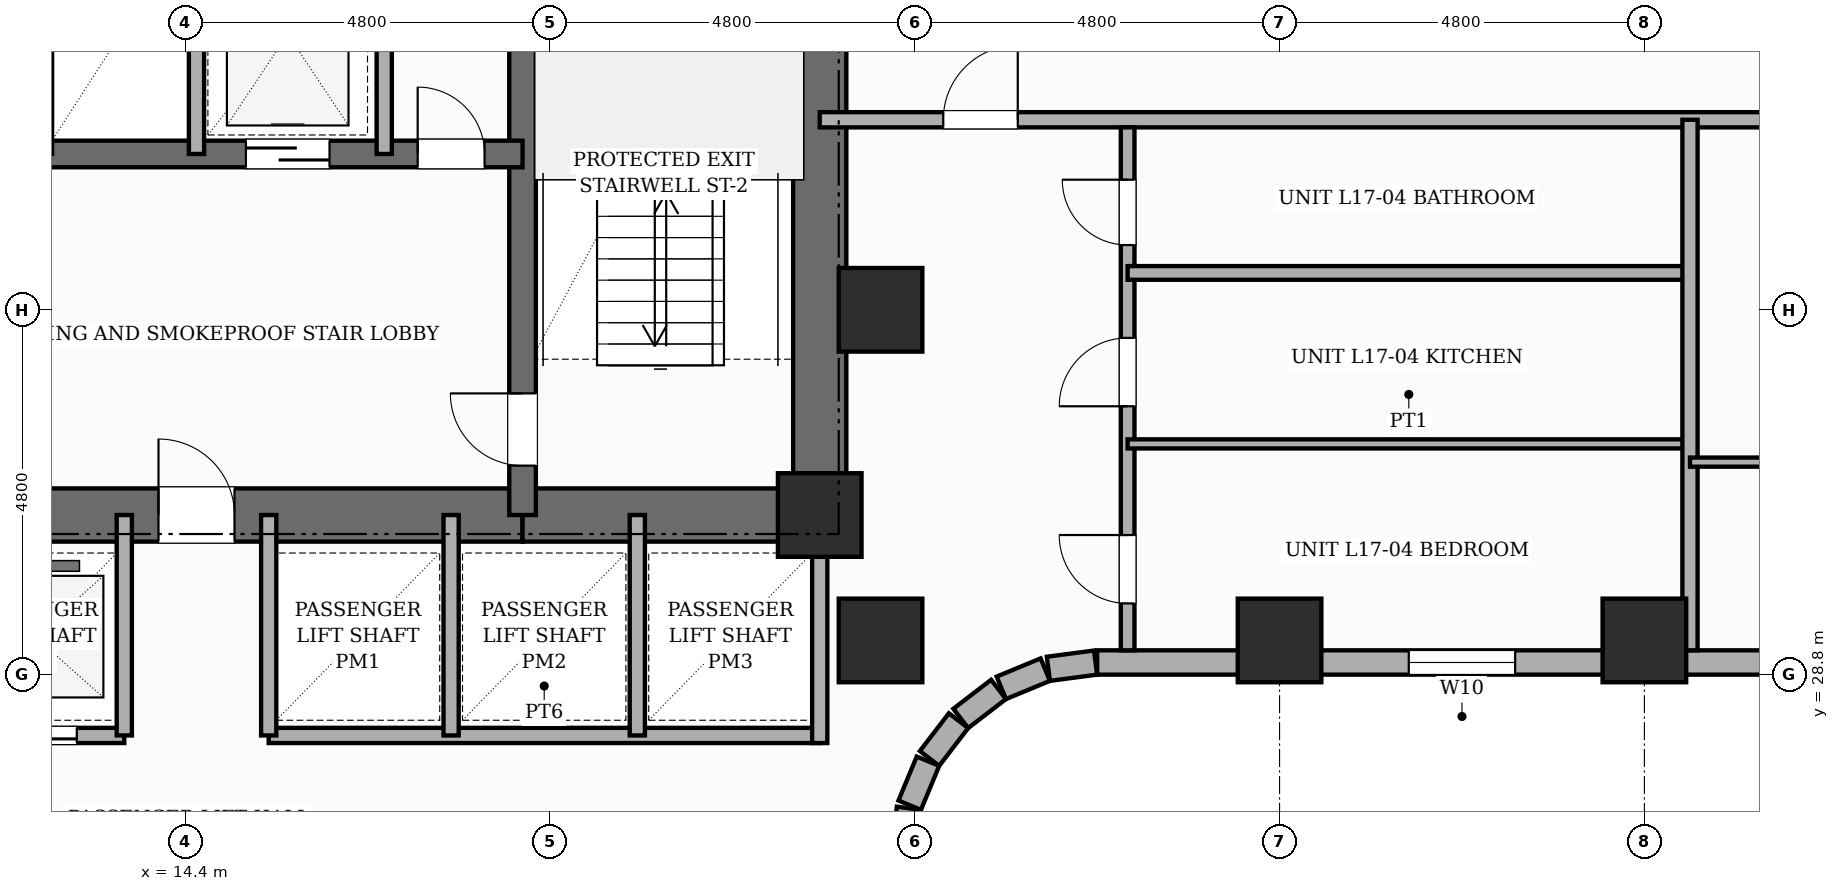
"""IFC4 building model, lengths in metres.
Left out: names, types, materials, properties, quantities, classifications, styles, units other than length and angle.
Written with IfcOpenShell. Run it as: python <this file> out.ifc"""

import sys

from ifc_helpers import new_model, si_unit, direction, frame, frame_2d, origin, origin_2d, place, context, subcontext, project, spatial, rectangle, extrude, element, fill, save


model = new_model("IFC4")
c1 = context("Model", 3, precision=1e-05, world=origin(), true_north=direction((0.0, 1.0)))
c2 = subcontext(c1, "Body", "Model", "MODEL_VIEW")
j1 = project(units=[si_unit("LENGTHUNIT", "METRE"), si_unit("PLANEANGLEUNIT", "RADIAN")], contexts=[c1])
p1 = place(None, origin())
s1 = spatial("IfcSite", under=j1, at=p1, CompositionType="ELEMENT")
p2 = place(p1, origin())
s2 = spatial("IfcBuilding", under=s1, at=p2, CompositionType="ELEMENT")
p3 = place(p2, frame((0.0, 0.0, 68.2)))
s3 = spatial("IfcBuildingStorey", under=s2, at=p3, CompositionType="ELEMENT", Elevation=68.2)
p4 = place(p3, frame((22.75, 30.55, 0.0), z_axis=(0.0, 0.0, 1.0), x_axis=(0.0, 1.0, 0.0)))
e1 = element("IfcWall", 1, at=p4, inside=s3, PredefinedType="SHEAR", context=c2, shape_type="SweptSolid", body=[
    extrude(rectangle(XDim=15.6, YDim=0.7, at=frame_2d((7.8, 0.0))), origin(), (0.0, 0.0, 1.0), 3.6),
])
p5 = place(p4, frame((10.8, 0.0, 0.0)))
e2 = element("IfcOpeningElement", 2, at=p5, cuts=e1, PredefinedType="OPENING", context=c2, shape_type="SweptSolid", body=[
    extrude(rectangle(XDim=1.0, YDim=2.15, at=frame_2d((0.5, 1.075))), frame((0.0, 0.36, 0.0), z_axis=(0.0, -1.0, 0.0), x_axis=(1.0, 0.0, 0.0)), (0.0, 0.0, 1.0), 0.72),
])
p6 = place(p3, frame((9.96, 30.9, 0.0), z_axis=(0.0, 0.0, 1.0), x_axis=(1.0, 0.0, 0.0)))
e3 = element("IfcWall", 3, at=p6, inside=s3, PredefinedType="SHEAR", context=c2, shape_type="SweptSolid", body=[
    extrude(rectangle(XDim=8.88, YDim=0.7, at=frame_2d((4.44, 0.0))), origin(), (0.0, 0.0, 1.0), 3.6),
])
p7 = place(p6, frame((4.09, 0.0, 0.0)))
e4 = element("IfcOpeningElement", 4, at=p7, cuts=e3, PredefinedType="OPENING", context=c2, shape_type="SweptSolid", body=[
    extrude(rectangle(XDim=1.0, YDim=2.15, at=frame_2d((0.5, 1.075))), frame((0.0, 0.36, 0.0), z_axis=(0.0, -1.0, 0.0), x_axis=(1.0, 0.0, 0.0)), (0.0, 0.0, 1.0), 0.72),
])
p8 = place(p3, frame((18.84, 30.9, 0.0), z_axis=(0.0, 0.0, 1.0), x_axis=(1.0, 0.0, 0.0)))
e5 = element("IfcWall", 5, at=p8, inside=s3, PredefinedType="SHEAR", context=c2, shape_type="SweptSolid", body=[
    extrude(rectangle(XDim=3.91, YDim=0.7, at=frame_2d((1.955, 0.0))), origin(), (0.0, 0.0, 1.0), 3.6),
])
p9 = place(p3, frame((18.84, 30.9, 0.0), z_axis=(0.0, 0.0, 1.0), x_axis=(0.0, 1.0, 0.0)))
e6 = element("IfcWall", 6, at=p9, inside=s3, PredefinedType="SHEAR", context=c2, shape_type="SweptSolid", body=[
    extrude(rectangle(XDim=14.9, YDim=0.35, at=frame_2d((7.45, 0.0))), origin(), (0.0, 0.0, 1.0), 3.6),
])
p10 = place(p9, frame((0.65, 0.0, 0.0)))
e7 = element("IfcOpeningElement", 7, at=p10, cuts=e6, PredefinedType="OPENING", context=c2, shape_type="SweptSolid", body=[
    extrude(rectangle(XDim=0.95, YDim=2.1, at=frame_2d((0.475, 1.05))), frame((0.0, 0.185, 0.0), z_axis=(0.0, -1.0, 0.0), x_axis=(1.0, 0.0, 0.0)), (0.0, 0.0, 1.0), 0.37),
])
p11 = place(p9, frame((10.45, 0.0, 0.0)))
e8 = element("IfcOpeningElement", 8, at=p11, cuts=e6, PredefinedType="OPENING", context=c2, shape_type="SweptSolid", body=[
    extrude(rectangle(XDim=1.0, YDim=2.15, at=frame_2d((0.5, 1.075))), frame((0.0, 0.185, 0.0), z_axis=(0.0, -1.0, 0.0), x_axis=(1.0, 0.0, 0.0)), (0.0, 0.0, 1.0), 0.37),
])
p12 = place(p3, frame((9.96, 35.65, 0.0), z_axis=(0.0, 0.0, 1.0), x_axis=(1.0, 0.0, 0.0)))
e9 = element("IfcWall", 9, at=p12, inside=s3, PredefinedType="SHEAR", context=c2, shape_type="SweptSolid", body=[
    extrude(rectangle(XDim=8.88, YDim=0.35, at=frame_2d((4.44, 0.0))), origin(), (0.0, 0.0, 1.0), 3.6),
])
p13 = place(p12, frame((0.84, 0.0, 0.0)))
e10 = element("IfcOpeningElement", 10, at=p13, cuts=e9, PredefinedType="OPENING", context=c2, shape_type="SweptSolid", body=[
    extrude(rectangle(XDim=1.1, YDim=2.15, at=frame_2d((0.55, 1.075))), frame((0.0, 0.185, 0.0), z_axis=(0.0, -1.0, 0.0), x_axis=(1.0, 0.0, 0.0)), (0.0, 0.0, 1.0), 0.37),
])
p14 = place(p12, frame((5.24, 0.0, 0.0)))
e11 = element("IfcOpeningElement", 11, at=p14, cuts=e9, PredefinedType="OPENING", context=c2, shape_type="SweptSolid", body=[
    extrude(rectangle(XDim=1.1, YDim=2.15, at=frame_2d((0.55, 1.075))), frame((0.0, 0.185, 0.0), z_axis=(0.0, -1.0, 0.0), x_axis=(1.0, 0.0, 0.0)), (0.0, 0.0, 1.0), 0.37),
])
p15 = place(p12, frame((7.5, 0.0, 0.0)))
e12 = element("IfcOpeningElement", 12, at=p15, cuts=e9, PredefinedType="OPENING", context=c2, shape_type="SweptSolid", body=[
    extrude(rectangle(XDim=0.88, YDim=2.1, at=frame_2d((0.44, 1.05))), frame((0.0, 0.185, 0.0), z_axis=(0.0, -1.0, 0.0), x_axis=(1.0, 0.0, 0.0)), (0.0, 0.0, 1.0), 0.37),
])
for number, where, z_axis, x_axis in (
    (13, (22.75, 30.9, 0.0), (0.0, 0.0, 1.0), (1.0, 0.0, 0.0)),
    (14, (23.55, 29.25, 0.0), (0.0, 0.0, 1.0), (1.0, 0.0, 0.0)),
    (15, (23.55, 33.6, 0.0), (0.0, 0.0, 1.0), (1.0, 0.0, 0.0)),
    (16, (28.8, 29.25, 0.0), (0.0, 0.0, 1.0), (1.0, 0.0, 0.0)),
    (17, (33.6, 29.25, 0.0), (0.0, 0.0, 1.0), (1.0, 0.0, 0.0)),
):
    element("IfcColumn", number, at=place(p3, frame(where, z_axis=z_axis, x_axis=x_axis)), inside=s3, PredefinedType="COLUMN", context=c2, shape_type="SweptSolid", body=[
        extrude(rectangle(XDim=1.1, YDim=1.1, at=origin_2d()), origin(), (0.0, 0.0, 1.0), 3.6),
    ])
p16 = place(p3, frame((55.2, 28.96, 0.0), z_axis=(0.0, 0.0, 1.0), x_axis=(-1.0, 0.0, 0.0)))
e18 = element("IfcWall", 18, at=p16, inside=s3, PredefinedType="STANDARD", context=c2, shape_type="SweptSolid", body=[
    extrude(rectangle(XDim=28.8, YDim=0.32, at=frame_2d((14.4, 0.0))), origin(), (0.0, 0.0, 1.0), 2.53),
])
p17 = place(p16, frame((23.3, 0.0, 0.65)))
e19 = element("IfcOpeningElement", 19, at=p17, cuts=e18, PredefinedType="OPENING", context=c2, shape_type="SweptSolid", body=[
    extrude(rectangle(XDim=1.4, YDim=1.1, at=frame_2d((0.7, 0.55))), frame((0.0, 0.17, 0.0), z_axis=(0.0, -1.0, 0.0), x_axis=(1.0, 0.0, 0.0)), (0.0, 0.0, 1.0), 0.34),
])
p18 = place(p16, frame((13.0, 0.0, 0.65)))
e20 = element("IfcOpeningElement", 20, at=p18, cuts=e18, PredefinedType="OPENING", context=c2, shape_type="SweptSolid", body=[
    extrude(rectangle(XDim=1.4, YDim=1.1, at=frame_2d((0.7, 0.55))), frame((0.0, 0.17, 0.0), z_axis=(0.0, -1.0, 0.0), x_axis=(1.0, 0.0, 0.0)), (0.0, 0.0, 1.0), 0.34),
])
p19 = place(p16, frame((4.79, 0.0, 0.65)))
e21 = element("IfcOpeningElement", 21, at=p19, cuts=e18, PredefinedType="OPENING", context=c2, shape_type="SweptSolid", body=[
    extrude(rectangle(XDim=1.4, YDim=1.1, at=frame_2d((0.7, 0.55))), frame((0.0, 0.17, 0.0), z_axis=(0.0, -1.0, 0.0), x_axis=(1.0, 0.0, 0.0)), (0.0, 0.0, 1.0), 0.34),
])
p20 = place(p16, frame((0.47, 0.0, 0.65)))
e22 = element("IfcOpeningElement", 22, at=p20, cuts=e18, PredefinedType="OPENING", context=c2, shape_type="SweptSolid", body=[
    extrude(rectangle(XDim=1.4, YDim=1.1, at=frame_2d((0.7, 0.55))), frame((0.0, 0.17, 0.0), z_axis=(0.0, -1.0, 0.0), x_axis=(1.0, 0.0, 0.0)), (0.0, 0.0, 1.0), 0.34),
])
p21 = place(p16, frame((15.055, 0.0, 0.45)))
e23 = element("IfcOpeningElement", 23, at=p21, cuts=e18, PredefinedType="OPENING", context=c2, shape_type="SweptSolid", body=[
    extrude(rectangle(XDim=0.95, YDim=1.8, at=frame_2d((0.475, 0.9))), frame((0.0, 0.17, 0.0), z_axis=(0.0, -1.0, 0.0), x_axis=(1.0, 0.0, 0.0)), (0.0, 0.0, 1.0), 0.34),
])
p22 = place(p3, frame((26.379, 28.958, 0.0), z_axis=(0.0, 0.0, 1.0), x_axis=(-0.991447664465, -0.130504898859, 0.0)))
e24 = element("IfcWall", 24, at=p22, inside=s3, PredefinedType="STANDARD", context=c2, shape_type="SweptSolid", body=[
    extrude(rectangle(XDim=0.627, YDim=0.32, at=frame_2d((0.313, 0.0))), origin(), (0.0, 0.0, 1.0), 2.53),
])
p23 = place(p3, frame((25.718, 28.866, 0.0), z_axis=(0.0, 0.0, 1.0), x_axis=(-0.923836271867, -0.382787856107, 0.0)))
e25 = element("IfcWall", 25, at=p23, inside=s3, PredefinedType="STANDARD", context=c2, shape_type="SweptSolid", body=[
    extrude(rectangle(XDim=0.626, YDim=0.32, at=frame_2d((0.313, 0.0))), origin(), (0.0, 0.0, 1.0), 3.35),
])
for number, where, z_axis, x_axis in (
    (26, (25.103, 28.605, 0.0), (0.0, 0.0, 1.0), (-0.793, -0.609, 0.0)),
    (27, (24.576, 28.195, 0.0), (0.0, 0.0, 1.0), (-0.609, -0.793, 0.0)),
):
    element("IfcWall", number, at=place(p3, frame(where, z_axis=z_axis, x_axis=x_axis)), inside=s3, PredefinedType="STANDARD", context=c2, shape_type="SweptSolid", body=[
        extrude(rectangle(XDim=0.626, YDim=0.32, at=frame_2d((0.313, 0.0))), origin(), (0.0, 0.0, 1.0), 3.35),
    ])
p24 = place(p3, frame((24.174, 27.661, 0.0), z_axis=(0.0, 0.0, 1.0), x_axis=(-0.382455093999, -0.923974080304, 0.0)))
e28 = element("IfcWall", 28, at=p24, inside=s3, PredefinedType="STANDARD", context=c2, shape_type="SweptSolid", body=[
    extrude(rectangle(XDim=0.626, YDim=0.32, at=frame_2d((0.313, 0.0))), origin(), (0.0, 0.0, 1.0), 3.35),
])
p25 = place(p3, frame((23.923, 27.042, 0.0), z_axis=(0.0, 0.0, 1.0), x_axis=(-0.130555323746, -0.9914410257, 0.0)))
e29 = element("IfcWall", 29, at=p25, inside=s3, PredefinedType="STANDARD", context=c2, shape_type="SweptSolid", body=[
    extrude(rectangle(XDim=0.626, YDim=0.32, at=frame_2d((0.313, 0.0))), origin(), (0.0, 0.0, 1.0), 2.53),
])
p26 = place(p3, frame((14.55, 35.65, 0.0), z_axis=(0.0, 0.0, 1.0), x_axis=(0.0, 1.0, 0.0)))
e30 = element("IfcWall", 30, at=p26, inside=s3, PredefinedType="POLYGONAL", context=c2, shape_type="SweptSolid", body=[
    extrude(rectangle(XDim=3.07, YDim=0.2, at=frame_2d((1.535, 0.0))), origin(), (0.0, 0.0, 1.0), 3.35),
])
p27 = place(p3, frame((17.02, 35.65, 0.0), z_axis=(0.0, 0.0, 1.0), x_axis=(0.0, 1.0, 0.0)))
e31 = element("IfcWall", 31, at=p27, inside=s3, PredefinedType="POLYGONAL", context=c2, shape_type="SweptSolid", body=[
    extrude(rectangle(XDim=5.15, YDim=0.2, at=frame_2d((2.575, 0.0))), origin(), (0.0, 0.0, 1.0), 3.35),
])
p28 = place(p3, frame((6.05, 28.0, 0.0), z_axis=(0.0, 0.0, 1.0), x_axis=(1.0, 0.0, 0.0)))
e32 = element("IfcWall", 32, at=p28, inside=s3, PredefinedType="POLYGONAL", context=c2, shape_type="SweptSolid", body=[
    extrude(rectangle(XDim=7.55, YDim=0.2, at=frame_2d((3.775, 0.0))), origin(), (0.0, 0.0, 1.0), 3.35),
])
p29 = place(p28, frame((0.925, 0.0, 0.0)))
e33 = element("IfcOpeningElement", 33, at=p29, cuts=e32, PredefinedType="OPENING", context=c2, shape_type="SweptSolid", body=[
    extrude(rectangle(XDim=1.1, YDim=2.15, at=frame_2d((0.55, 1.075))), frame((0.0, 0.11, 0.0), z_axis=(0.0, -1.0, 0.0), x_axis=(1.0, 0.0, 0.0)), (0.0, 0.0, 1.0), 0.22),
])
p30 = place(p28, frame((3.375, 0.0, 0.0)))
e34 = element("IfcOpeningElement", 34, at=p30, cuts=e32, PredefinedType="OPENING", context=c2, shape_type="SweptSolid", body=[
    extrude(rectangle(XDim=1.1, YDim=2.15, at=frame_2d((0.55, 1.075))), frame((0.0, 0.11, 0.0), z_axis=(0.0, -1.0, 0.0), x_axis=(1.0, 0.0, 0.0)), (0.0, 0.0, 1.0), 0.22),
])
p31 = place(p28, frame((5.825, 0.0, 0.0)))
e35 = element("IfcOpeningElement", 35, at=p31, cuts=e32, PredefinedType="OPENING", context=c2, shape_type="SweptSolid", body=[
    extrude(rectangle(XDim=1.1, YDim=2.15, at=frame_2d((0.55, 1.075))), frame((0.0, 0.11, 0.0), z_axis=(0.0, -1.0, 0.0), x_axis=(1.0, 0.0, 0.0)), (0.0, 0.0, 1.0), 0.22),
])
p32 = place(p3, frame((15.5, 28.0, 0.0), z_axis=(0.0, 0.0, 1.0), x_axis=(1.0, 0.0, 0.0)))
e36 = element("IfcWall", 36, at=p32, inside=s3, PredefinedType="POLYGONAL", context=c2, shape_type="SweptSolid", body=[
    extrude(rectangle(XDim=7.25, YDim=0.2, at=frame_2d((3.625, 0.0))), origin(), (0.0, 0.0, 1.0), 3.35),
])
p33 = place(p3, frame((22.75, 27.9, 0.0), z_axis=(0.0, 0.0, 1.0), x_axis=(0.0, 1.0, 0.0)))
e37 = element("IfcWall", 37, at=p33, inside=s3, PredefinedType="POLYGONAL", context=c2, shape_type="SweptSolid", body=[
    extrude(rectangle(XDim=3.0, YDim=0.2, at=frame_2d((1.5, 0.0))), origin(), (0.0, 0.0, 1.0), 3.35),
])
for number, where, z_axis, x_axis in (
    (38, (13.6, 28.0, 0.0), (0.0, 0.0, 1.0), (0.0, 1.0, 0.0)),
    (39, (15.5, 28.0, 0.0), (0.0, 0.0, 1.0), (0.0, 1.0, 0.0)),
    (40, (17.9, 28.0, 0.0), (0.0, 0.0, 1.0), (0.0, 1.0, 0.0)),
    (41, (20.35, 28.0, 0.0), (0.0, 0.0, 1.0), (0.0, 1.0, 0.0)),
):
    element("IfcWall", number, at=place(p3, frame(where, z_axis=z_axis, x_axis=x_axis)), inside=s3, PredefinedType="POLYGONAL", context=c2, shape_type="SweptSolid", body=[
        extrude(rectangle(XDim=2.9, YDim=0.2, at=frame_2d((1.45, 0.0))), origin(), (0.0, 0.0, 1.0), 3.35),
    ])
p34 = place(p3, frame((22.75, 36.1, 0.0), z_axis=(0.0, 0.0, 1.0), x_axis=(1.0, 0.0, 0.0)))
e42 = element("IfcWall", 42, at=p34, inside=s3, PredefinedType="PARTITIONING", context=c2, shape_type="SweptSolid", body=[
    extrude(rectangle(XDim=21.27, YDim=0.2, at=frame_2d((10.635, 0.0))), origin(), (0.0, 0.0, 1.0), 3.35),
])
p35 = place(p34, frame((1.625, 0.0, 0.0)))
e43 = element("IfcOpeningElement", 43, at=p35, cuts=e42, PredefinedType="OPENING", context=c2, shape_type="SweptSolid", body=[
    extrude(rectangle(XDim=0.98, YDim=2.18, at=frame_2d((0.49, 1.09))), frame((0.0, 0.11, 0.0), z_axis=(0.0, -1.0, 0.0), x_axis=(1.0, 0.0, 0.0)), (0.0, 0.0, 1.0), 0.22),
])
p36 = place(p34, frame((14.084, 0.0, 0.0)))
e44 = element("IfcOpeningElement", 44, at=p36, cuts=e42, PredefinedType="OPENING", context=c2, shape_type="SweptSolid", body=[
    extrude(rectangle(XDim=0.98, YDim=2.18, at=frame_2d((0.49, 1.09))), frame((0.0, 0.11, 0.0), z_axis=(0.0, -1.0, 0.0), x_axis=(1.0, 0.0, 0.0)), (0.0, 0.0, 1.0), 0.22),
])
p37 = place(p3, frame((26.801, 29.12, 0.0), z_axis=(0.0, 0.0, 1.0), x_axis=(0.0, 1.0, 0.0)))
e45 = element("IfcWall", 45, at=p37, inside=s3, PredefinedType="PLUMBINGWALL", context=c2, shape_type="SweptSolid", body=[
    extrude(rectangle(XDim=6.88, YDim=0.18, at=frame_2d((3.44, 0.0))), origin(), (0.0, 0.0, 1.0), 3.35),
])
p38 = place(p37, frame((0.617, 0.0, 0.0)))
e46 = element("IfcOpeningElement", 46, at=p38, cuts=e45, PredefinedType="OPENING", context=c2, shape_type="SweptSolid", body=[
    extrude(rectangle(XDim=0.9, YDim=2.15, at=frame_2d((0.45, 1.075))), frame((0.0, 0.1, 0.0), z_axis=(0.0, -1.0, 0.0), x_axis=(1.0, 0.0, 0.0)), (0.0, 0.0, 1.0), 0.2),
])
p39 = place(p37, frame((3.21, 0.0, 0.0)))
e47 = element("IfcOpeningElement", 47, at=p39, cuts=e45, PredefinedType="OPENING", context=c2, shape_type="SweptSolid", body=[
    extrude(rectangle(XDim=0.9, YDim=2.15, at=frame_2d((0.45, 1.075))), frame((0.0, 0.1, 0.0), z_axis=(0.0, -1.0, 0.0), x_axis=(1.0, 0.0, 0.0)), (0.0, 0.0, 1.0), 0.2),
])
p40 = place(p37, frame((5.332, 0.0, 0.0)))
e48 = element("IfcOpeningElement", 48, at=p40, cuts=e45, PredefinedType="OPENING", context=c2, shape_type="SweptSolid", body=[
    extrude(rectangle(XDim=0.86, YDim=2.1, at=frame_2d((0.43, 1.05))), frame((0.0, 0.1, 0.0), z_axis=(0.0, -1.0, 0.0), x_axis=(1.0, 0.0, 0.0)), (0.0, 0.0, 1.0), 0.2),
])
p41 = place(p3, frame((26.801, 31.836, 0.0), z_axis=(0.0, 0.0, 1.0), x_axis=(1.0, 0.0, 0.0)))
e49 = element("IfcWall", 49, at=p41, inside=s3, PredefinedType="PARTITIONING", context=c2, shape_type="SweptSolid", body=[
    extrude(rectangle(XDim=7.399, YDim=0.12, at=frame_2d((3.699, 0.0))), origin(), (0.0, 0.0, 1.0), 3.35),
])
p42 = place(p3, frame((26.801, 34.085, 0.0), z_axis=(0.0, 0.0, 1.0), x_axis=(1.0, 0.0, 0.0)))
e50 = element("IfcWall", 50, at=p42, inside=s3, PredefinedType="PLUMBINGWALL", context=c2, shape_type="SweptSolid", body=[
    extrude(rectangle(XDim=7.399, YDim=0.18, at=frame_2d((3.699, 0.0))), origin(), (0.0, 0.0, 1.0), 3.35),
])
p43 = place(p3, frame((34.2, 29.12, 0.0), z_axis=(0.0, 0.0, 1.0), x_axis=(0.0, 1.0, 0.0)))
e51 = element("IfcWall", 51, at=p43, inside=s3, PredefinedType="SOLIDWALL", context=c2, shape_type="SweptSolid", body=[
    extrude(rectangle(XDim=6.98, YDim=0.2, at=frame_2d((3.49, 0.0))), origin(), (0.0, 0.0, 1.0), 3.35),
])
p44 = place(p3, frame((34.2, 31.596, 0.0), z_axis=(0.0, 0.0, 1.0), x_axis=(1.0, 0.0, 0.0)))
e52 = element("IfcWall", 52, at=p44, inside=s3, PredefinedType="PARTITIONING", context=c2, shape_type="SweptSolid", body=[
    extrude(rectangle(XDim=6.169, YDim=0.12, at=frame_2d((3.084, 0.0))), origin(), (0.0, 0.0, 1.0), 3.35),
])
p45 = place(p44, frame((2.335, 0.0, 0.0)))
e53 = element("IfcOpeningElement", 53, at=p45, cuts=e52, PredefinedType="OPENING", context=c2, shape_type="SweptSolid", body=[
    extrude(rectangle(XDim=0.9, YDim=2.15, at=frame_2d((0.45, 1.075))), frame((0.0, 0.07, 0.0), z_axis=(0.0, -1.0, 0.0), x_axis=(1.0, 0.0, 0.0)), (0.0, 0.0, 1.0), 0.14),
])
p46 = place(p17, origin())
e54 = element("IfcWindow", 54, at=p46, inside=s3, PartitioningType="SINGLE_PANEL", PredefinedType="WINDOW", context=c2, shape_type="SweptSolid", body=[
    extrude(rectangle(XDim=1.4, YDim=1.1, at=frame_2d((0.7, 0.55))), frame((0.0, 0.03, 0.0), z_axis=(0.0, -1.0, 0.0), x_axis=(1.0, 0.0, 0.0)), (0.0, 0.0, 1.0), 0.06),
])
fill(e19, e54)
p47 = place(p10, origin())
e55 = element("IfcDoor", 55, at=p47, inside=s3, OperationType="SINGLE_SWING_RIGHT", PredefinedType="DOOR", context=c2, shape_type="SweptSolid", body=[
    extrude(rectangle(XDim=0.95, YDim=2.1, at=frame_2d((0.475, 1.05))), frame((0.0, 0.025, 0.0), z_axis=(0.0, -1.0, 0.0), x_axis=(1.0, 0.0, 0.0)), (0.0, 0.0, 1.0), 0.05),
])
fill(e7, e55)
p48 = place(p7, origin())
e56 = element("IfcDoor", 56, at=p48, inside=s3, OperationType="SINGLE_SWING_LEFT", PredefinedType="DOOR", context=c2, shape_type="SweptSolid", body=[
    extrude(rectangle(XDim=1.0, YDim=2.15, at=frame_2d((0.5, 1.075))), frame((0.0, 0.025, 0.0), z_axis=(0.0, -1.0, 0.0), x_axis=(1.0, 0.0, 0.0)), (0.0, 0.0, 1.0), 0.05),
])
fill(e4, e56)
p49 = place(p14, origin())
e57 = element("IfcDoor", 57, at=p49, inside=s3, OperationType="SLIDING_TO_RIGHT", PredefinedType="DOOR", context=c2, shape_type="SweptSolid", body=[
    extrude(rectangle(XDim=1.1, YDim=2.15, at=frame_2d((0.55, 1.075))), frame((0.0, 0.025, 0.0), z_axis=(0.0, -1.0, 0.0), x_axis=(1.0, 0.0, 0.0)), (0.0, 0.0, 1.0), 0.05),
])
fill(e11, e57)
p50 = place(p15, origin())
e58 = element("IfcDoor", 58, at=p50, inside=s3, OperationType="SINGLE_SWING_LEFT", PredefinedType="DOOR", context=c2, shape_type="SweptSolid", body=[
    extrude(rectangle(XDim=0.88, YDim=2.1, at=frame_2d((0.44, 1.05))), frame((0.0, 0.025, 0.0), z_axis=(0.0, -1.0, 0.0), x_axis=(1.0, 0.0, 0.0)), (0.0, 0.0, 1.0), 0.05),
])
fill(e12, e58)
p51 = place(p31, origin())
e59 = element("IfcDoor", 59, at=p51, inside=s3, OperationType="SLIDING_TO_LEFT", PredefinedType="DOOR", context=c2, shape_type="SweptSolid", body=[
    extrude(rectangle(XDim=1.1, YDim=2.15, at=frame_2d((0.55, 1.075))), frame((0.0, 0.025, 0.0), z_axis=(0.0, -1.0, 0.0), x_axis=(1.0, 0.0, 0.0)), (0.0, 0.0, 1.0), 0.05),
])
fill(e35, e59)
p52 = place(p35, origin())
e60 = element("IfcDoor", 60, at=p52, inside=s3, OperationType="SINGLE_SWING_RIGHT", PredefinedType="DOOR", context=c2, shape_type="SweptSolid", body=[
    extrude(rectangle(XDim=0.98, YDim=2.18, at=frame_2d((0.49, 1.09))), frame((0.0, 0.025, 0.0), z_axis=(0.0, -1.0, 0.0), x_axis=(1.0, 0.0, 0.0)), (0.0, 0.0, 1.0), 0.05),
])
fill(e43, e60)
p53 = place(p38, origin())
e61 = element("IfcDoor", 61, at=p53, inside=s3, OperationType="SINGLE_SWING_RIGHT", PredefinedType="DOOR", context=c2, shape_type="SweptSolid", body=[
    extrude(rectangle(XDim=0.9, YDim=2.15, at=frame_2d((0.45, 1.075))), frame((0.0, 0.025, 0.0), z_axis=(0.0, -1.0, 0.0), x_axis=(1.0, 0.0, 0.0)), (0.0, 0.0, 1.0), 0.05),
])
fill(e46, e61)
p54 = place(p39, origin())
e62 = element("IfcDoor", 62, at=p54, inside=s3, OperationType="SINGLE_SWING_LEFT", PredefinedType="DOOR", context=c2, shape_type="SweptSolid", body=[
    extrude(rectangle(XDim=0.9, YDim=2.15, at=frame_2d((0.45, 1.075))), frame((0.0, 0.025, 0.0), z_axis=(0.0, -1.0, 0.0), x_axis=(1.0, 0.0, 0.0)), (0.0, 0.0, 1.0), 0.05),
])
fill(e47, e62)
p55 = place(p40, origin())
e63 = element("IfcDoor", 63, at=p55, inside=s3, OperationType="SINGLE_SWING_RIGHT", PredefinedType="DOOR", context=c2, shape_type="SweptSolid", body=[
    extrude(rectangle(XDim=0.86, YDim=2.1, at=frame_2d((0.43, 1.05))), frame((0.0, 0.025, 0.0), z_axis=(0.0, -1.0, 0.0), x_axis=(1.0, 0.0, 0.0)), (0.0, 0.0, 1.0), 0.05),
])
fill(e48, e63)
save(model, sys.argv[1])
